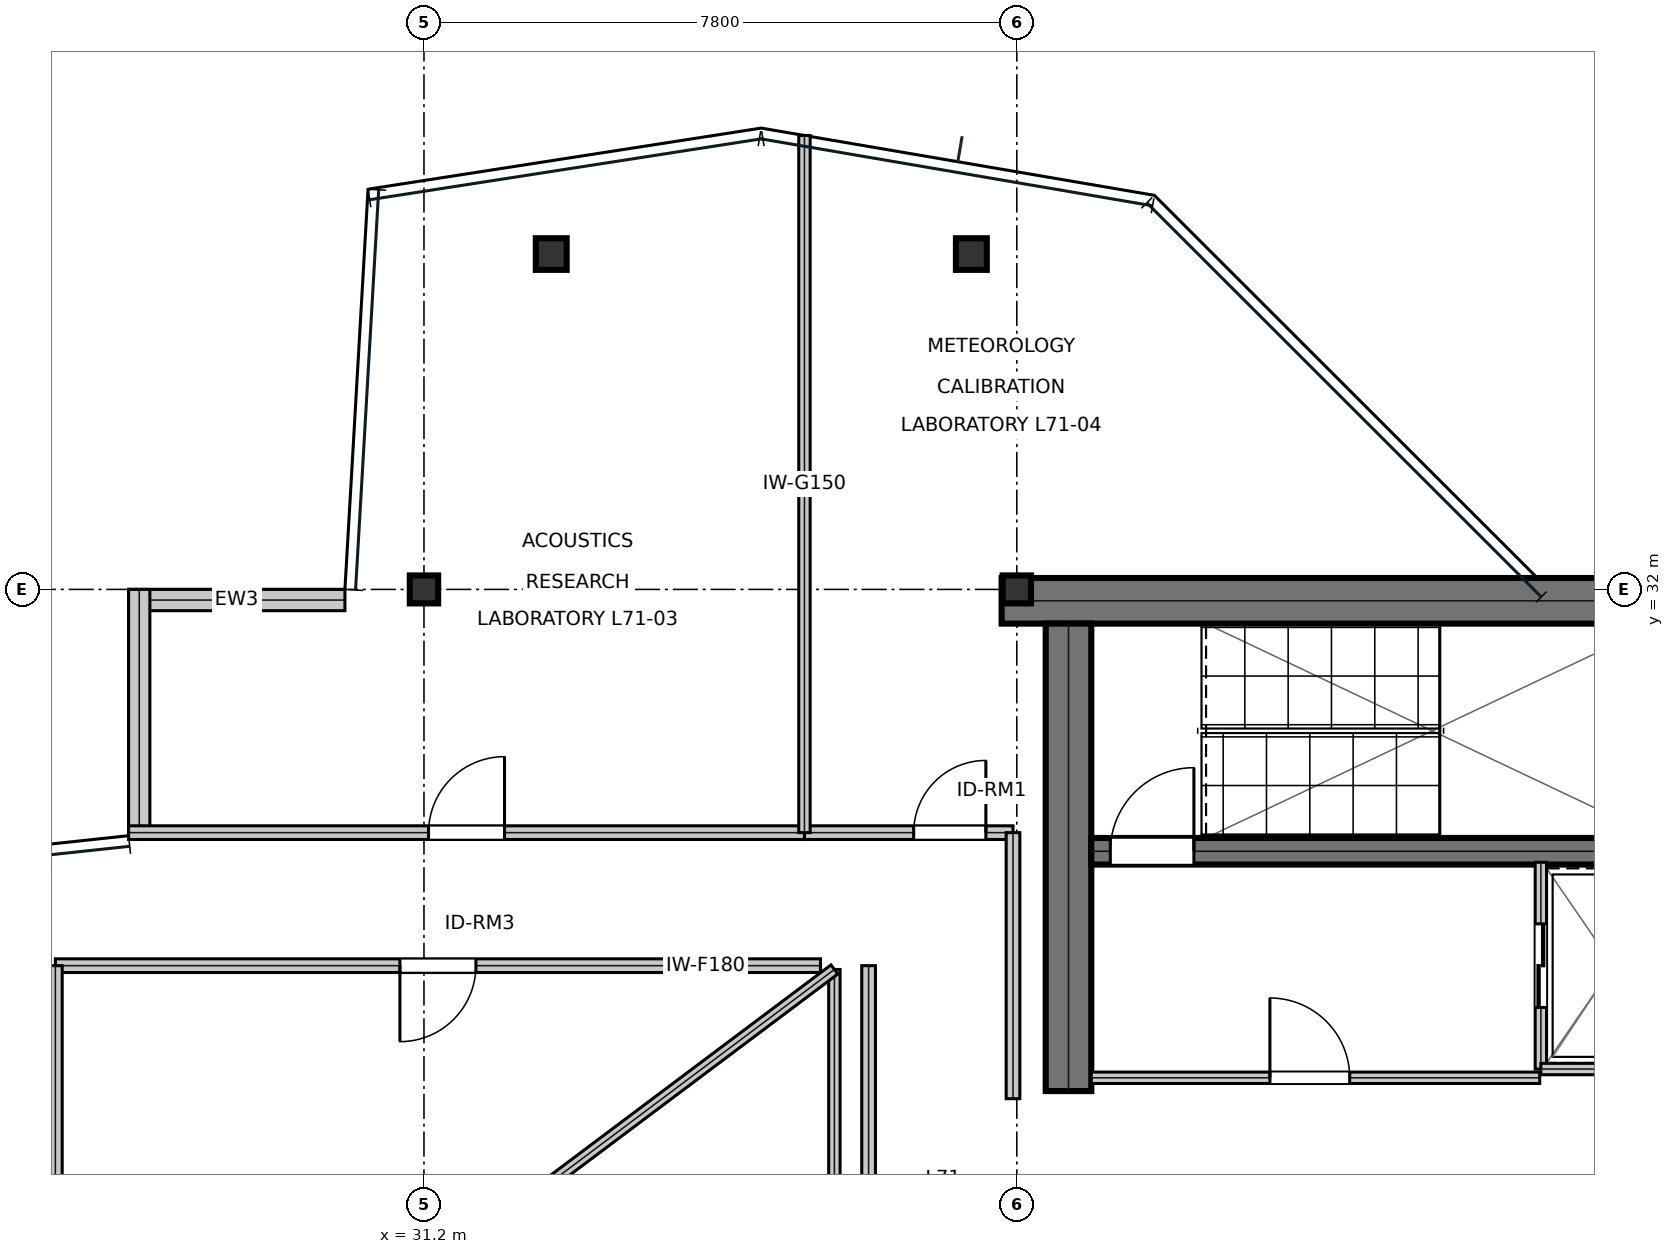
"""IFC4 building model, lengths in metres.
Left out: names, types, materials, properties, quantities, classifications, styles, units other than length and angle.
Written with IfcOpenShell. Run it as: python <this file> out.ifc"""

import sys

from ifc_helpers import new_model, si_unit, direction, frame, frame_2d, origin, origin_2d, place, context, subcontext, project, spatial, rectangle, i_section, extrude, element, fill, save


model = new_model("IFC4")
c1 = context("Model", 3, precision=1e-05, world=origin(), true_north=direction((0.0, 1.0)))
c2 = subcontext(c1, "Body", "Model", "MODEL_VIEW")
j1 = project(units=[si_unit("LENGTHUNIT", "METRE"), si_unit("PLANEANGLEUNIT", "RADIAN")], contexts=[c1])
p1 = place(None, origin())
s1 = spatial("IfcSite", under=j1, at=p1, CompositionType="ELEMENT")
p2 = place(p1, origin())
s2 = spatial("IfcBuilding", under=s1, at=p2, CompositionType="ELEMENT")
p3 = place(p2, frame((0.0, 0.0, 303.3)))
s3 = spatial("IfcBuildingStorey", under=s2, at=p3, CompositionType="ELEMENT", Elevation=303.3)
p4 = place(p3, frame((38.8, 31.85, 0.0), z_axis=(0.0, 0.0, 1.0), x_axis=(1.0, 0.0, 0.0)))
e1 = element("IfcWall", 1, at=p4, inside=s3, PredefinedType="SHEAR", context=c2, shape_type="SweptSolid", body=[
    extrude(rectangle(XDim=16.0, YDim=0.6, at=frame_2d((8.0, 0.0))), origin(), (0.0, 0.0, 1.0), 3.81),
])
p5 = place(p3, frame((39.68, 25.4, 0.0), z_axis=(0.0, 0.0, 1.0), x_axis=(0.0, 1.0, 0.0)))
e2 = element("IfcWall", 2, at=p5, inside=s3, PredefinedType="SHEAR", context=c2, shape_type="SweptSolid", body=[
    extrude(rectangle(XDim=6.15, YDim=0.6, at=frame_2d((3.075, 0.0))), origin(), (0.0, 0.0, 1.0), 3.81),
])
p6 = place(p3, frame((39.98, 28.555, 0.0), z_axis=(0.0, 0.0, 1.0), x_axis=(1.0, 0.0, 0.0)))
e3 = element("IfcWall", 3, at=p6, inside=s3, PredefinedType="SHEAR", context=c2, shape_type="SweptSolid", body=[
    extrude(rectangle(XDim=7.71, YDim=0.35, at=frame_2d((3.855, 0.0))), origin(), (0.0, 0.0, 1.0), 3.81),
])
p7 = place(p6, frame((0.25, 0.0, 0.0)))
e4 = element("IfcOpeningElement", 4, at=p7, cuts=e3, PredefinedType="OPENING", context=c2, shape_type="SweptSolid", body=[
    extrude(rectangle(XDim=1.1, YDim=2.15, at=frame_2d((0.55, 1.075))), frame((0.0, 0.185, 0.0), z_axis=(0.0, -1.0, 0.0), x_axis=(1.0, 0.0, 0.0)), (0.0, 0.0, 1.0), 0.37),
])
for number, where, z_axis, x_axis in (
    (5, (31.2, 32.0, 0.0), (0.0, 0.0, 1.0), (1.0, 0.0, 0.0)),
    (6, (39.0, 32.0, 0.0), (0.0, 0.0, 1.0), (1.0, 0.0, 0.0)),
):
    element("IfcColumn", number, at=place(p3, frame(where, z_axis=z_axis, x_axis=x_axis)), inside=s3, PredefinedType="COLUMN", context=c2, shape_type="SweptSolid", body=[
        extrude(i_section(OverallWidth=0.373, OverallDepth=0.368, WebThickness=0.015, FlangeThickness=0.024, at=origin_2d()), origin(), (0.0, 0.0, 1.0), 4.044),
    ])
for number, where, z_axis, x_axis in (
    (7, (32.875, 36.412, 0.016), (0.0, 0.0, 1.0), (1.0, 0.0, 0.0)),
    (8, (38.402, 36.412, 0.016), (0.0, 0.0, 1.0), (1.0, 0.0, 0.0)),
):
    element("IfcColumn", number, at=place(p3, frame(where, z_axis=z_axis, x_axis=x_axis)), inside=s3, PredefinedType="COLUMN", context=c2, shape_type="SweptSolid", body=[
        extrude(i_section(OverallWidth=0.406, OverallDepth=0.416, WebThickness=0.03, FlangeThickness=0.048, at=origin_2d()), origin(), (0.0, 0.0, 1.0), 4.018),
    ])
p8 = place(p3, frame((30.16, 31.86, 0.0), z_axis=(0.0, 0.0, 1.0), x_axis=(-1.0, 0.0, 0.0)))
e9 = element("IfcWall", 9, at=p8, inside=s3, PredefinedType="STANDARD", context=c2, shape_type="SweptSolid", body=[
    extrude(rectangle(XDim=2.846, YDim=0.28, at=frame_2d((1.423, 0.0))), origin(), (0.0, 0.0, 1.0), 3.81),
])
p9 = place(p3, frame((27.454, 32.0, 0.0), z_axis=(0.0, 0.0, 1.0), x_axis=(0.0, -1.0, 0.0)))
e10 = element("IfcWall", 10, at=p9, inside=s3, PredefinedType="STANDARD", context=c2, shape_type="SweptSolid", body=[
    extrude(rectangle(XDim=3.24, YDim=0.28, at=frame_2d((1.62, 0.0))), origin(), (0.0, 0.0, 1.0), 3.339),
])
p10 = place(p3, frame((39.98, 25.575, 0.0), z_axis=(0.0, 0.0, 1.0), x_axis=(1.0, 0.0, 0.0)))
e11 = element("IfcWall", 11, at=p10, inside=s3, PredefinedType="PARTITIONING", context=c2, shape_type="SweptSolid", body=[
    extrude(rectangle(XDim=5.9, YDim=0.15, at=frame_2d((2.95, 0.0))), origin(), (0.0, 0.0, 1.0), 3.81),
])
p11 = place(p10, frame((2.35, 0.0, 0.0)))
e12 = element("IfcOpeningElement", 12, at=p11, cuts=e11, PredefinedType="OPENING", context=c2, shape_type="SweptSolid", body=[
    extrude(rectangle(XDim=1.05, YDim=2.15, at=frame_2d((0.525, 1.075))), frame((0.0, 0.085, 0.0), z_axis=(0.0, -1.0, 0.0), x_axis=(1.0, 0.0, 0.0)), (0.0, 0.0, 1.0), 0.17),
])
p12 = place(p3, frame((45.895, 25.69, 0.0), z_axis=(0.0, 0.0, 1.0), x_axis=(0.0, 1.0, 0.0)))
e13 = element("IfcWall", 13, at=p12, inside=s3, PredefinedType="PARTITIONING", context=c2, shape_type="SweptSolid", body=[
    extrude(rectangle(XDim=2.72, YDim=0.15, at=frame_2d((1.36, 0.0))), origin(), (0.0, 0.0, 1.0), 3.81),
])
p13 = place(p12, frame((0.81, 0.0, 0.0)))
e14 = element("IfcOpeningElement", 14, at=p13, cuts=e13, PredefinedType="OPENING", context=c2, shape_type="SweptSolid", body=[
    extrude(rectangle(XDim=1.1, YDim=2.15, at=frame_2d((0.55, 1.075))), frame((0.0, 0.085, 0.0), z_axis=(0.0, -1.0, 0.0), x_axis=(1.0, 0.0, 0.0)), (0.0, 0.0, 1.0), 0.17),
])
p14 = place(p3, frame((45.895, 25.69, 0.0), z_axis=(0.0, 0.0, 1.0), x_axis=(1.0, 0.0, 0.0)))
e15 = element("IfcWall", 15, at=p14, inside=s3, PredefinedType="PARTITIONING", context=c2, shape_type="SweptSolid", body=[
    extrude(rectangle(XDim=1.915, YDim=0.15, at=frame_2d((0.958, 0.0))), origin(), (0.0, 0.0, 1.0), 3.81),
])
p15 = place(p3, frame((26.35, 27.05, 0.0), z_axis=(0.0, 0.0, 1.0), x_axis=(1.0, 0.0, 0.0)))
e16 = element("IfcWall", 16, at=p15, inside=s3, PredefinedType="SOLIDWALL", context=c2, shape_type="SweptSolid", body=[
    extrude(rectangle(XDim=10.067, YDim=0.18, at=frame_2d((5.033, 0.0))), origin(), (0.0, 0.0, 1.0), 3.27),
])
p16 = place(p15, frame((4.533, 0.0, 0.0)))
e17 = element("IfcOpeningElement", 17, at=p16, cuts=e16, PredefinedType="OPENING", context=c2, shape_type="SweptSolid", body=[
    extrude(rectangle(XDim=1.0, YDim=2.15, at=frame_2d((0.5, 1.075))), frame((0.0, 0.1, 0.0), z_axis=(0.0, -1.0, 0.0), x_axis=(1.0, 0.0, 0.0)), (0.0, 0.0, 1.0), 0.2),
])
p17 = place(p3, frame((27.314, 28.8, 0.0), z_axis=(0.0, 0.0, 1.0), x_axis=(1.0, 0.0, 0.0)))
e18 = element("IfcWall", 18, at=p17, inside=s3, PredefinedType="SOLIDWALL", context=c2, shape_type="SweptSolid", body=[
    extrude(rectangle(XDim=8.892, YDim=0.18, at=frame_2d((4.446, 0.0))), origin(), (0.0, 0.0, 1.0), 3.27),
])
p18 = place(p17, frame((3.946, 0.0, 0.0)))
e19 = element("IfcOpeningElement", 19, at=p18, cuts=e18, PredefinedType="OPENING", context=c2, shape_type="SweptSolid", body=[
    extrude(rectangle(XDim=1.0, YDim=2.15, at=frame_2d((0.5, 1.075))), frame((0.0, 0.1, 0.0), z_axis=(0.0, -1.0, 0.0), x_axis=(1.0, 0.0, 0.0)), (0.0, 0.0, 1.0), 0.2),
])
p19 = place(p3, frame((36.206, 28.8, 0.0), z_axis=(0.0, 0.0, 1.0), x_axis=(1.0, 0.0, 0.0)))
e20 = element("IfcWall", 20, at=p19, inside=s3, PredefinedType="SOLIDWALL", context=c2, shape_type="SweptSolid", body=[
    extrude(rectangle(XDim=2.744, YDim=0.18, at=frame_2d((1.372, 0.0))), origin(), (0.0, 0.0, 1.0), 3.81),
])
p20 = place(p19, frame((1.437, 0.0, 0.0)))
e21 = element("IfcOpeningElement", 21, at=p20, cuts=e20, PredefinedType="OPENING", context=c2, shape_type="SweptSolid", body=[
    extrude(rectangle(XDim=0.95, YDim=2.15, at=frame_2d((0.475, 1.075))), frame((0.0, 0.1, 0.0), z_axis=(0.0, -1.0, 0.0), x_axis=(1.0, 0.0, 0.0)), (0.0, 0.0, 1.0), 0.2),
])
p21 = place(p3, frame((37.05, 19.2, 0.0), z_axis=(0.0, 0.0, 1.0), x_axis=(0.0, 1.0, 0.0)))
e22 = element("IfcWall", 22, at=p21, inside=s3, PredefinedType="SOLIDWALL", context=c2, shape_type="SweptSolid", body=[
    extrude(rectangle(XDim=7.85, YDim=0.18, at=frame_2d((3.925, 0.0))), origin(), (0.0, 0.0, 1.0), 3.54),
])
p22 = place(p3, frame((26.35, 19.343, 0.0), z_axis=(0.0, 0.0, 1.0), x_axis=(0.0, 1.0, 0.0)))
e23 = element("IfcWall", 23, at=p22, inside=s3, PredefinedType="SOLIDWALL", context=c2, shape_type="SweptSolid", body=[
    extrude(rectangle(XDim=7.707, YDim=0.18, at=frame_2d((3.854, 0.0))), origin(), (0.0, 0.0, 1.0), 3.27),
])
p23 = place(p3, frame((38.95, 25.3, 0.0), z_axis=(0.0, 0.0, 1.0), x_axis=(0.0, 1.0, 0.0)))
e24 = element("IfcWall", 24, at=p23, inside=s3, PredefinedType="SOLIDWALL", context=c2, shape_type="SweptSolid", body=[
    extrude(rectangle(XDim=3.5, YDim=0.18, at=frame_2d((1.75, 0.0))), origin(), (0.0, 0.0, 1.0), 3.54),
])
p24 = place(p3, frame((36.206, 28.8, 0.0), z_axis=(0.0, 0.0, 1.0), x_axis=(0.0, 1.0, 0.0)))
e25 = element("IfcWall", 25, at=p24, inside=s3, PredefinedType="MOVABLE", context=c2, shape_type="SweptSolid", body=[
    extrude(rectangle(XDim=9.172, YDim=0.15, at=frame_2d((4.586, 0.0))), origin(), (0.0, 0.0, 1.0), 3.27),
])
p25 = place(p3, frame((36.6, 21.0, 0.0), z_axis=(0.0, 0.0, 1.0), x_axis=(0.0, 1.0, 0.0)))
e26 = element("IfcWall", 26, at=p25, inside=s3, PredefinedType="MOVABLE", context=c2, shape_type="SweptSolid", body=[
    extrude(rectangle(XDim=6.0, YDim=0.15, at=frame_2d((3.0, 0.0))), origin(), (0.0, 0.0, 1.0), 3.81),
])
p26 = place(p3, frame((36.6, 27.0, 0.0), z_axis=(0.0, 0.0, 1.0), x_axis=(-0.8, -0.6, 0.0)))
e27 = element("IfcWall", 27, at=p26, inside=s3, PredefinedType="MOVABLE", context=c2, shape_type="SweptSolid", body=[
    extrude(rectangle(XDim=5.0, YDim=0.15, at=frame_2d((2.5, 0.0))), origin(), (0.0, 0.0, 1.0), 3.81),
])
p27 = place(p11, origin())
e28 = element("IfcDoor", 28, at=p27, inside=s3, OperationType="SINGLE_SWING_LEFT", PredefinedType="DOOR", context=c2, shape_type="SweptSolid", body=[
    extrude(rectangle(XDim=1.05, YDim=2.15, at=frame_2d((0.525, 1.075))), frame((0.0, 0.025, 0.0), z_axis=(0.0, -1.0, 0.0), x_axis=(1.0, 0.0, 0.0)), (0.0, 0.0, 1.0), 0.05),
])
fill(e12, e28)
p28 = place(p13, frame((1.1, 0.0, 0.0), z_axis=(0.0, 0.0, 1.0), x_axis=(-1.0, 0.0, 0.0)))
e29 = element("IfcDoor", 29, at=p28, inside=s3, OperationType="DOUBLE_DOOR_SLIDING", PredefinedType="DOOR", context=c2, shape_type="SweptSolid", body=[
    extrude(rectangle(XDim=1.1, YDim=2.15, at=frame_2d((0.55, 1.075))), frame((0.0, 0.025, 0.0), z_axis=(0.0, -1.0, 0.0), x_axis=(1.0, 0.0, 0.0)), (0.0, 0.0, 1.0), 0.05),
])
fill(e14, e29)
p29 = place(p16, frame((1.0, 0.0, 0.0), z_axis=(0.0, 0.0, 1.0), x_axis=(-1.0, 0.0, 0.0)))
e30 = element("IfcDoor", 30, at=p29, inside=s3, OperationType="SINGLE_SWING_RIGHT", PredefinedType="DOOR", context=c2, shape_type="SweptSolid", body=[
    extrude(rectangle(XDim=1.0, YDim=2.15, at=frame_2d((0.5, 1.075))), frame((0.0, 0.025, 0.0), z_axis=(0.0, -1.0, 0.0), x_axis=(1.0, 0.0, 0.0)), (0.0, 0.0, 1.0), 0.05),
])
fill(e17, e30)
p30 = place(p18, origin())
e31 = element("IfcDoor", 31, at=p30, inside=s3, OperationType="SINGLE_SWING_RIGHT", PredefinedType="DOOR", context=c2, shape_type="SweptSolid", body=[
    extrude(rectangle(XDim=1.0, YDim=2.15, at=frame_2d((0.5, 1.075))), frame((0.0, 0.025, 0.0), z_axis=(0.0, -1.0, 0.0), x_axis=(1.0, 0.0, 0.0)), (0.0, 0.0, 1.0), 0.05),
])
fill(e19, e31)
p31 = place(p20, origin())
e32 = element("IfcDoor", 32, at=p31, inside=s3, OperationType="SINGLE_SWING_RIGHT", PredefinedType="DOOR", context=c2, shape_type="SweptSolid", body=[
    extrude(rectangle(XDim=0.95, YDim=2.15, at=frame_2d((0.475, 1.075))), frame((0.0, 0.025, 0.0), z_axis=(0.0, -1.0, 0.0), x_axis=(1.0, 0.0, 0.0)), (0.0, 0.0, 1.0), 0.05),
])
fill(e21, e32)
p32 = place(p7, origin())
e33 = element("IfcDoor", 33, at=p32, inside=s3, OperationType="SINGLE_SWING_RIGHT", PredefinedType="DOOR", context=c2, shape_type="SweptSolid", body=[
    extrude(rectangle(XDim=1.1, YDim=2.15, at=frame_2d((0.55, 1.075))), frame((0.0, 0.025, 0.0), z_axis=(0.0, -1.0, 0.0), x_axis=(1.0, 0.0, 0.0)), (0.0, 0.0, 1.0), 0.05),
])
fill(e4, e33)
save(model, sys.argv[1])
